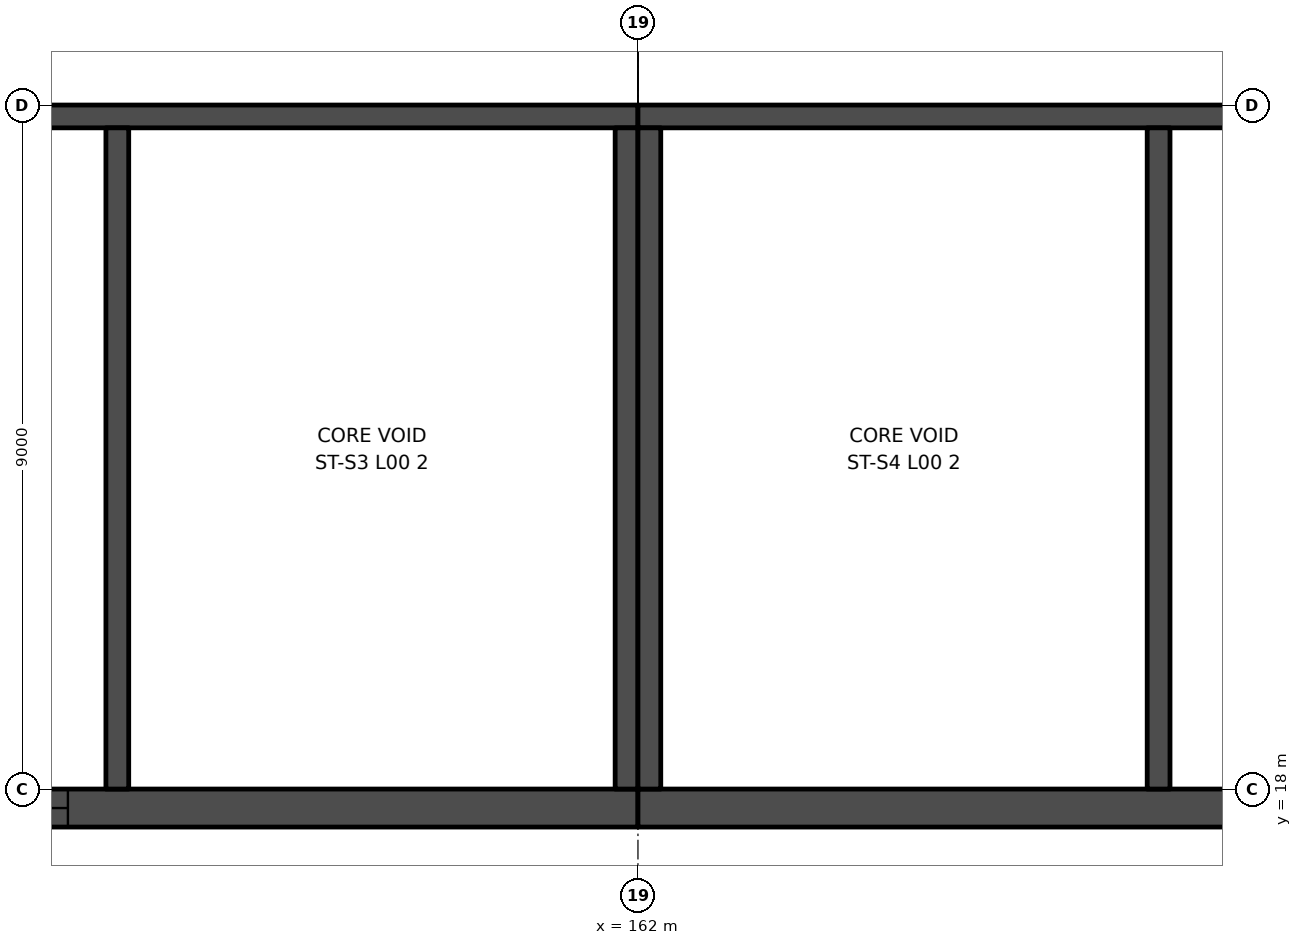
"""IFC4 building model, lengths in metres.
Left out: names, types, materials, properties, quantities, classifications, styles, units other than length and angle.
Written with IfcOpenShell. Run it as: python <this file> out.ifc"""

import sys

from ifc_helpers import new_model, si_unit, direction, frame, frame_2d, origin, place, context, subcontext, project, spatial, rectangle, extrude, element, fill, save


model = new_model("IFC4")
c1 = context("Model", 3, precision=1e-05, world=origin(), true_north=direction((0.0, 1.0)))
c2 = subcontext(c1, "Body", "Model", "MODEL_VIEW")
j1 = project(units=[si_unit("LENGTHUNIT", "METRE"), si_unit("PLANEANGLEUNIT", "RADIAN")], contexts=[c1])
p1 = place(None, origin())
s1 = spatial("IfcSite", under=j1, at=p1, CompositionType="ELEMENT")
p2 = place(p1, origin())
s2 = spatial("IfcBuilding", under=s1, at=p2, CompositionType="ELEMENT")
p3 = place(p2, origin())
s3 = spatial("IfcBuildingStorey", under=s2, at=p3, CompositionType="ELEMENT", Elevation=0.0)
p4 = place(p3, frame((144.0, 26.85, 0.0), z_axis=(0.0, 0.0, 1.0), x_axis=(1.0, 0.0, 0.0)))
e1 = element("IfcWall", 1, at=p4, inside=s3, PredefinedType="SHEAR", context=c2, shape_type="SweptSolid", body=[
    extrude(rectangle(XDim=18.0, YDim=0.3, at=frame_2d((9.0, 0.0))), origin(), (0.0, 0.0, 1.0), 7.0),
])
p5 = place(p4, frame((8.6, 0.0, 0.0)))
e2 = element("IfcOpeningElement", 2, at=p5, cuts=e1, PredefinedType="OPENING", context=c2, shape_type="SweptSolid", body=[
    extrude(rectangle(XDim=1.2, YDim=2.1, at=frame_2d((0.6, 1.05))), frame((0.0, 0.16, 0.0), z_axis=(0.0, -1.0, 0.0), x_axis=(1.0, 0.0, 0.0)), (0.0, 0.0, 1.0), 0.32),
])
p6 = place(p3, frame((144.0, 17.75, 0.0), z_axis=(0.0, 0.0, 1.0), x_axis=(1.0, 0.0, 0.0)))
e3 = element("IfcWall", 3, at=p6, inside=s3, PredefinedType="SHEAR", context=c2, shape_type="SweptSolid", body=[
    extrude(rectangle(XDim=18.0, YDim=0.5, at=frame_2d((9.0, 0.0))), origin(), (0.0, 0.0, 1.0), 7.0),
])
p7 = place(p6, frame((7.9, 0.0, 0.0)))
e4 = element("IfcOpeningElement", 4, at=p7, cuts=e3, PredefinedType="OPENING", context=c2, shape_type="SweptSolid", body=[
    extrude(rectangle(XDim=2.6, YDim=2.4, at=frame_2d((1.3, 1.2))), frame((0.0, 0.26, 0.0), z_axis=(0.0, -1.0, 0.0), x_axis=(1.0, 0.0, 0.0)), (0.0, 0.0, 1.0), 0.52),
])
for number, where, z_axis, x_axis in (
    (5, (161.85, 26.7, 0.0), (0.0, 0.0, 1.0), (0.0, -1.0, 0.0)),
    (6, (155.15, 26.7, 0.0), (0.0, 0.0, 1.0), (0.0, -1.0, 0.0)),
):
    element("IfcWall", number, at=place(p3, frame(where, z_axis=z_axis, x_axis=x_axis)), inside=s3, PredefinedType="SHEAR", context=c2, shape_type="SweptSolid", body=[
        extrude(rectangle(XDim=8.7, YDim=0.3, at=frame_2d((4.35, 0.0))), origin(), (0.0, 0.0, 1.0), 7.0),
    ])
p8 = place(p3, frame((180.0, 26.85, 0.0), z_axis=(0.0, 0.0, 1.0), x_axis=(-1.0, 0.0, 0.0)))
e7 = element("IfcWall", 7, at=p8, inside=s3, PredefinedType="SHEAR", context=c2, shape_type="SweptSolid", body=[
    extrude(rectangle(XDim=18.0, YDim=0.3, at=frame_2d((9.0, 0.0))), origin(), (0.0, 0.0, 1.0), 7.0),
])
p9 = place(p8, frame((1.5, 0.0, 0.0)))
e8 = element("IfcOpeningElement", 8, at=p9, cuts=e7, PredefinedType="OPENING", context=c2, shape_type="SweptSolid", body=[
    extrude(rectangle(XDim=1.2, YDim=2.1, at=frame_2d((0.6, 1.05))), frame((0.0, 0.16, 0.0), z_axis=(0.0, -1.0, 0.0), x_axis=(1.0, 0.0, 0.0)), (0.0, 0.0, 1.0), 0.32),
])
p10 = place(p3, frame((180.0, 17.75, 0.0), z_axis=(0.0, 0.0, 1.0), x_axis=(-1.0, 0.0, 0.0)))
e9 = element("IfcWall", 9, at=p10, inside=s3, PredefinedType="SHEAR", context=c2, shape_type="SweptSolid", body=[
    extrude(rectangle(XDim=18.0, YDim=0.5, at=frame_2d((9.0, 0.0))), origin(), (0.0, 0.0, 1.0), 7.0),
])
p11 = place(p10, frame((0.8, 0.0, 0.0)))
e10 = element("IfcOpeningElement", 10, at=p11, cuts=e9, PredefinedType="OPENING", context=c2, shape_type="SweptSolid", body=[
    extrude(rectangle(XDim=2.6, YDim=2.4, at=frame_2d((1.3, 1.2))), frame((0.0, 0.26, 0.0), z_axis=(0.0, -1.0, 0.0), x_axis=(1.0, 0.0, 0.0)), (0.0, 0.0, 1.0), 0.52),
])
for number, where, z_axis, x_axis in (
    (11, (162.15, 26.7, 0.0), (0.0, 0.0, 1.0), (0.0, -1.0, 0.0)),
    (12, (168.85, 26.7, 0.0), (0.0, 0.0, 1.0), (0.0, -1.0, 0.0)),
):
    element("IfcWall", number, at=place(p3, frame(where, z_axis=z_axis, x_axis=x_axis)), inside=s3, PredefinedType="SHEAR", context=c2, shape_type="SweptSolid", body=[
        extrude(rectangle(XDim=8.7, YDim=0.3, at=frame_2d((4.35, 0.0))), origin(), (0.0, 0.0, 1.0), 7.0),
    ])
p12 = place(p7, frame((2.6, 0.0, 0.0), z_axis=(0.0, 0.0, 1.0), x_axis=(-1.0, 0.0, 0.0)))
e13 = element("IfcDoor", 13, at=p12, inside=s3, OperationType="DOUBLE_DOOR_SINGLE_SWING", PredefinedType="DOOR", context=c2, shape_type="SweptSolid", body=[
    extrude(rectangle(XDim=2.6, YDim=2.4, at=frame_2d((1.3, 1.2))), frame((0.0, 0.025, 0.0), z_axis=(0.0, -1.0, 0.0), x_axis=(1.0, 0.0, 0.0)), (0.0, 0.0, 1.0), 0.05),
])
fill(e4, e13)
save(model, sys.argv[1])
